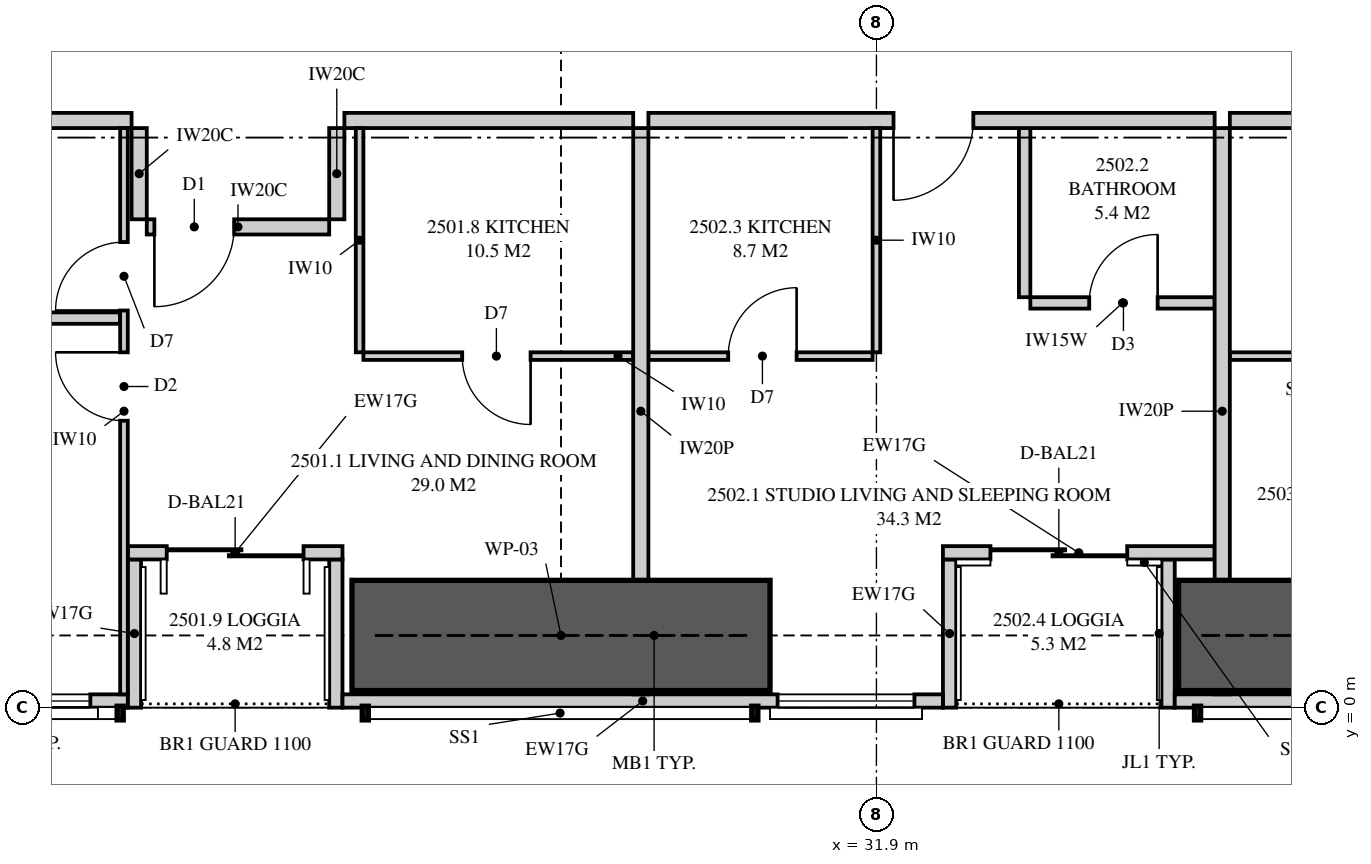
"""IFC4 building model, lengths in metres.
Left out: names, types, materials, properties, quantities, classifications, styles, units other than length and angle.
Written with IfcOpenShell. Run it as: python <this file> out.ifc"""

import sys

from ifc_helpers import new_model, si_unit, direction, frame, frame_2d, origin, place, context, subcontext, project, spatial, polyline, rectangle, outline, extrude, element, fill, save


model = new_model("IFC4")
c1 = context("Model", 3, precision=1e-05, world=origin(), true_north=direction((0.0, 1.0)))
c2 = subcontext(c1, "Body", "Model", "MODEL_VIEW")
j1 = project(units=[si_unit("LENGTHUNIT", "METRE"), si_unit("PLANEANGLEUNIT", "RADIAN")], contexts=[c1])
p1 = place(None, origin())
s1 = spatial("IfcSite", under=j1, at=p1, CompositionType="ELEMENT")
p2 = place(p1, origin())
s2 = spatial("IfcBuilding", under=s1, at=p2, CompositionType="ELEMENT")
p3 = place(p2, frame((0.0, 0.0, 94.8)))
s3 = spatial("IfcBuildingStorey", under=s2, at=p3, CompositionType="ELEMENT", Elevation=94.8)
p4 = place(p3, frame((9.051, 0.087, 0.0), z_axis=(0.0, 0.0, 1.0), x_axis=(1.0, 0.0, 0.0)))
e1 = element("IfcWall", 1, at=p4, inside=s3, PredefinedType="SOLIDWALL", context=c2, shape_type="SweptSolid", body=[
    extrude(outline(polyline([(0.0, 0.0), (12.999, 0.0), (12.999, 2.15), (7.824, 2.15), (7.824, 3.11), (7.666, 3.11), (7.666, 2.15), (7.62, 2.15), (7.62, 3.11), (0.0, 3.11), (0.0, 0.0)])), frame((0.0, 0.087, 0.0), z_axis=(0.0, -1.0, 0.0), x_axis=(1.0, 0.0, 0.0)), (0.0, 0.0, 1.0), 0.175),
])
p5 = place(p4, frame((3.134, 0.0, 0.4)))
e2 = element("IfcOpeningElement", 2, at=p5, cuts=e1, PredefinedType="OPENING", context=c2, shape_type="SweptSolid", body=[
    extrude(rectangle(XDim=1.8, YDim=1.7, at=frame_2d((0.9, 0.85))), frame((0.0, 0.097, 0.0), z_axis=(0.0, -1.0, 0.0), x_axis=(1.0, 0.0, 0.0)), (0.0, 0.0, 1.0), 0.195),
])
p6 = place(p4, frame((10.706, 0.0, 0.4)))
e3 = element("IfcOpeningElement", 3, at=p6, cuts=e1, PredefinedType="OPENING", context=c2, shape_type="SweptSolid", body=[
    extrude(rectangle(XDim=1.8, YDim=1.7, at=frame_2d((0.9, 0.85))), frame((0.0, 0.097, 0.0), z_axis=(0.0, -1.0, 0.0), x_axis=(1.0, 0.0, 0.0)), (0.0, 0.0, 1.0), 0.195),
])
p7 = place(p3, frame((24.875, 0.087, 0.0), z_axis=(0.0, 0.0, 1.0), x_axis=(1.0, 0.0, 0.0)))
e4 = element("IfcWall", 4, at=p7, inside=s3, PredefinedType="SOLIDWALL", context=c2, shape_type="SweptSolid", body=[
    extrude(rectangle(XDim=7.9, YDim=0.175, at=frame_2d((3.95, 0.0))), origin(), (0.0, 0.0, 1.0), 2.15),
])
p8 = place(p7, frame((5.725, 0.0, 0.4)))
e5 = element("IfcOpeningElement", 5, at=p8, cuts=e4, PredefinedType="OPENING", context=c2, shape_type="SweptSolid", body=[
    extrude(rectangle(XDim=1.8, YDim=1.7, at=frame_2d((0.9, 0.85))), frame((0.0, 0.097, 0.0), z_axis=(0.0, -1.0, 0.0), x_axis=(1.0, 0.0, 0.0)), (0.0, 0.0, 1.0), 0.195),
])
p9 = place(p3, frame((35.825, 0.087, 0.0), z_axis=(0.0, 0.0, 1.0), x_axis=(1.0, 0.0, 0.0)))
e6 = element("IfcWall", 6, at=p9, inside=s3, PredefinedType="SOLIDWALL", context=c2, shape_type="SweptSolid", body=[
    extrude(outline(polyline([(0.0, 0.0), (5.6, 0.0), (5.6, 3.11), (3.003, 3.11), (3.003, 2.15), (2.958, 2.15), (2.958, 3.11), (2.8, 3.11), (2.8, 2.15), (0.0, 2.15), (0.0, 0.0)])), frame((0.0, 0.087, 0.0), z_axis=(0.0, -1.0, 0.0), x_axis=(1.0, 0.0, 0.0)), (0.0, 0.0, 1.0), 0.175),
])
p10 = place(p3, frame((22.05, 2.038, 0.0), z_axis=(0.0, 0.0, 1.0), x_axis=(1.0, 0.0, 0.0)))
e7 = element("IfcWall", 7, at=p10, inside=s3, PredefinedType="SOLIDWALL", context=c2, shape_type="SweptSolid", body=[
    extrude(rectangle(XDim=2.825, YDim=0.175, at=frame_2d((1.413, 0.0))), origin(), (0.0, 0.0, 1.0), 3.11),
])
p11 = place(p10, frame((0.512, 0.0, 0.0)))
e8 = element("IfcOpeningElement", 8, at=p11, cuts=e7, PredefinedType="OPENING", context=c2, shape_type="SweptSolid", body=[
    extrude(rectangle(XDim=1.8, YDim=2.1, at=frame_2d((0.9, 1.05))), frame((0.0, 0.097, 0.0), z_axis=(0.0, -1.0, 0.0), x_axis=(1.0, 0.0, 0.0)), (0.0, 0.0, 1.0), 0.195),
])
for number, where, z_axis, x_axis in (
    (9, (22.137, 0.0, 0.0), (0.0, 0.0, 1.0), (0.0, 1.0, 0.0)),
    (10, (24.788, 0.0, 0.0), (0.0, 0.0, 1.0), (0.0, 1.0, 0.0)),
):
    element("IfcWall", number, at=place(p3, frame(where, z_axis=z_axis, x_axis=x_axis)), inside=s3, PredefinedType="SOLIDWALL", context=c2, shape_type="SweptSolid", body=[
        extrude(outline(polyline([(0.0, 0.0), (1.95, 0.0), (1.95, 3.11), (1.75, 3.11), (1.75, 2.15), (0.15, 2.15), (0.15, 3.11), (0.0, 3.11), (0.0, 0.0)])), frame((0.0, 0.087, 0.0), z_axis=(0.0, -1.0, 0.0), x_axis=(1.0, 0.0, 0.0)), (0.0, 0.0, 1.0), 0.175),
    ])
p12 = place(p3, frame((32.775, 2.038, 0.0), z_axis=(0.0, 0.0, 1.0), x_axis=(1.0, 0.0, 0.0)))
e11 = element("IfcWall", 11, at=p12, inside=s3, PredefinedType="SOLIDWALL", context=c2, shape_type="SweptSolid", body=[
    extrude(rectangle(XDim=3.575, YDim=0.175, at=frame_2d((1.788, 0.0))), origin(), (0.0, 0.0, 1.0), 3.11),
])
p13 = place(p12, frame((0.625, 0.0, 0.0)))
e12 = element("IfcOpeningElement", 12, at=p13, cuts=e11, PredefinedType="OPENING", context=c2, shape_type="SweptSolid", body=[
    extrude(rectangle(XDim=1.8, YDim=2.1, at=frame_2d((0.9, 1.05))), frame((0.0, 0.097, 0.0), z_axis=(0.0, -1.0, 0.0), x_axis=(1.0, 0.0, 0.0)), (0.0, 0.0, 1.0), 0.195),
])
for number, where, z_axis, x_axis in (
    (13, (32.863, 0.0, 0.0), (0.0, 0.0, 1.0), (0.0, 1.0, 0.0)),
    (14, (35.738, 0.0, 0.0), (0.0, 0.0, 1.0), (0.0, 1.0, 0.0)),
):
    element("IfcWall", number, at=place(p3, frame(where, z_axis=z_axis, x_axis=x_axis)), inside=s3, PredefinedType="SOLIDWALL", context=c2, shape_type="SweptSolid", body=[
        extrude(outline(polyline([(0.0, 0.0), (1.95, 0.0), (1.95, 3.11), (1.75, 3.11), (1.75, 2.15), (0.15, 2.15), (0.15, 3.11), (0.0, 3.11), (0.0, 0.0)])), frame((0.0, 0.087, 0.0), z_axis=(0.0, -1.0, 0.0), x_axis=(1.0, 0.0, 0.0)), (0.0, 0.0, 1.0), 0.175),
    ])
p14 = place(p3, frame((28.8, 0.175, 0.0), z_axis=(0.0, 0.0, 1.0), x_axis=(0.0, 1.0, 0.0)))
e15 = element("IfcWall", 15, at=p14, inside=s3, PredefinedType="PARTITIONING", context=c2, shape_type="SweptSolid", body=[
    extrude(outline(polyline([(0.529, 2.15), (0.0, 2.15), (0.0, 0.0), (0.529, 0.0), (0.529, 0.786), (1.021, 0.786), (1.021, 0.0), (7.45, 0.0), (7.45, 3.11), (1.685, 3.11), (1.685, 2.15), (1.021, 2.15), (1.021, 1.364), (0.529, 1.364), (0.529, 2.15)])), frame((0.0, 0.1, 0.0), z_axis=(0.0, -1.0, 0.0), x_axis=(1.0, 0.0, 0.0)), (0.0, 0.0, 1.0), 0.2),
])
p15 = place(p3, frame((17.775, 7.725, 0.0), z_axis=(0.0, 0.0, 1.0), x_axis=(1.0, 0.0, 0.0)))
e16 = element("IfcWall", 16, at=p15, inside=s3, PredefinedType="PARTITIONING", context=c2, shape_type="SweptSolid", body=[
    extrude(rectangle(XDim=4.325, YDim=0.2, at=frame_2d((2.163, 0.0))), origin(), (0.0, 0.0, 1.0), 3.11),
])
p16 = place(p3, frame((22.0, 0.175, 0.0), z_axis=(0.0, 0.0, 1.0), x_axis=(0.0, 1.0, 0.0)))
e17 = element("IfcWall", 17, at=p16, inside=s3, PredefinedType="PARTITIONING", context=c2, shape_type="SweptSolid", body=[
    extrude(outline(polyline([(0.0, 0.0), (7.45, 0.0), (7.45, 3.11), (1.635, 3.11), (1.635, 2.15), (0.0, 2.15), (0.0, 3.11), (0.0, 0.0)])), frame((0.0, 0.05, 0.0), z_axis=(0.0, -1.0, 0.0), x_axis=(1.0, 0.0, 0.0)), (0.0, 0.0, 1.0), 0.1),
])
p17 = place(p16, frame((3.6, 0.0, 0.0)))
e18 = element("IfcOpeningElement", 18, at=p17, cuts=e17, PredefinedType="OPENING", context=c2, shape_type="SweptSolid", body=[
    extrude(rectangle(XDim=0.9, YDim=2.1, at=frame_2d((0.45, 1.05))), frame((0.0, 0.06, 0.0), z_axis=(0.0, -1.0, 0.0), x_axis=(1.0, 0.0, 0.0)), (0.0, 0.0, 1.0), 0.12),
])
p18 = place(p16, frame((5.05, 0.0, 0.0)))
e19 = element("IfcOpeningElement", 19, at=p18, cuts=e17, PredefinedType="OPENING", context=c2, shape_type="SweptSolid", body=[
    extrude(rectangle(XDim=0.9, YDim=2.1, at=frame_2d((0.45, 1.05))), frame((0.0, 0.06, 0.0), z_axis=(0.0, -1.0, 0.0), x_axis=(1.0, 0.0, 0.0)), (0.0, 0.0, 1.0), 0.12),
])
p19 = place(p3, frame((17.75, 5.125, 0.0), z_axis=(0.0, 0.0, 1.0), x_axis=(1.0, 0.0, 0.0)))
e20 = element("IfcWall", 20, at=p19, inside=s3, PredefinedType="PLUMBINGWALL", context=c2, shape_type="SweptSolid", body=[
    extrude(rectangle(XDim=4.2, YDim=0.15, at=frame_2d((2.1, 0.0))), origin(), (0.0, 0.0, 1.0), 3.11),
])
p20 = place(p3, frame((25.15, 4.625, 0.0), z_axis=(0.0, 0.0, 1.0), x_axis=(1.0, 0.0, 0.0)))
e21 = element("IfcWall", 21, at=p20, inside=s3, PredefinedType="PARTITIONING", context=c2, shape_type="SweptSolid", body=[
    extrude(outline(polyline([(0.0, 0.0), (3.55, 0.0), (3.55, 3.11), (2.887, 3.11), (2.887, 2.541), (2.312, 2.541), (2.312, 3.11), (0.0, 3.11), (0.0, 0.0)])), frame((0.0, 0.05, 0.0), z_axis=(0.0, -1.0, 0.0), x_axis=(1.0, 0.0, 0.0)), (0.0, 0.0, 1.0), 0.1),
])
p21 = place(p20, frame((1.3, 0.0, 0.0)))
e22 = element("IfcOpeningElement", 22, at=p21, cuts=e21, PredefinedType="OPENING", context=c2, shape_type="SweptSolid", body=[
    extrude(rectangle(XDim=0.9, YDim=2.1, at=frame_2d((0.45, 1.05))), frame((0.0, 0.06, 0.0), z_axis=(0.0, -1.0, 0.0), x_axis=(1.0, 0.0, 0.0)), (0.0, 0.0, 1.0), 0.12),
])
p22 = place(p3, frame((25.1, 4.675, 0.0), z_axis=(0.0, 0.0, 1.0), x_axis=(0.0, 1.0, 0.0)))
e23 = element("IfcWall", 23, at=p22, inside=s3, PredefinedType="PARTITIONING", context=c2, shape_type="SweptSolid", body=[
    extrude(rectangle(XDim=2.95, YDim=0.1, at=frame_2d((1.475, 0.0))), origin(), (0.0, 0.0, 1.0), 3.11),
])
p23 = place(p3, frame((36.45, 0.175, 0.0), z_axis=(0.0, 0.0, 1.0), x_axis=(0.0, 1.0, 0.0)))
e24 = element("IfcWall", 24, at=p23, inside=s3, PredefinedType="PARTITIONING", context=c2, shape_type="SweptSolid", body=[
    extrude(outline(polyline([(0.529, 2.15), (0.0, 2.15), (0.0, 0.0), (0.529, 0.0), (0.529, 0.017), (1.021, 0.017), (1.021, 0.0), (7.45, 0.0), (7.45, 3.11), (1.685, 3.11), (1.685, 2.15), (1.021, 2.15), (1.021, 2.133), (0.529, 2.133), (0.529, 2.15)])), frame((0.0, 0.1, 0.0), z_axis=(0.0, -1.0, 0.0), x_axis=(1.0, 0.0, 0.0)), (0.0, 0.0, 1.0), 0.2),
])
p24 = place(p3, frame((28.9, 7.725, 0.0), z_axis=(0.0, 0.0, 1.0), x_axis=(1.0, 0.0, 0.0)))
e25 = element("IfcWall", 25, at=p24, inside=s3, PredefinedType="PARTITIONING", context=c2, shape_type="SweptSolid", body=[
    extrude(rectangle(XDim=7.45, YDim=0.2, at=frame_2d((3.725, 0.0))), origin(), (0.0, 0.0, 1.0), 3.11),
])
p25 = place(p24, frame((3.225, 0.0, 0.0)))
e26 = element("IfcOpeningElement", 26, at=p25, cuts=e25, PredefinedType="OPENING", context=c2, shape_type="SweptSolid", body=[
    extrude(rectangle(XDim=1.05, YDim=2.2, at=frame_2d((0.525, 1.1))), frame((0.0, 0.11, 0.0), z_axis=(0.0, -1.0, 0.0), x_axis=(1.0, 0.0, 0.0)), (0.0, 0.0, 1.0), 0.22),
])
p26 = place(p3, frame((33.925, 5.325, 0.0), z_axis=(0.0, 0.0, 1.0), x_axis=(1.0, 0.0, 0.0)))
e27 = element("IfcWall", 27, at=p26, inside=s3, PredefinedType="PLUMBINGWALL", context=c2, shape_type="SweptSolid", body=[
    extrude(rectangle(XDim=2.425, YDim=0.15, at=frame_2d((1.212, 0.0))), origin(), (0.0, 0.0, 1.0), 3.11),
])
p27 = place(p26, frame((0.775, 0.0, 0.0)))
e28 = element("IfcOpeningElement", 28, at=p27, cuts=e27, PredefinedType="OPENING", context=c2, shape_type="SweptSolid", body=[
    extrude(rectangle(XDim=0.9, YDim=2.1, at=frame_2d((0.45, 1.05))), frame((0.0, 0.085, 0.0), z_axis=(0.0, -1.0, 0.0), x_axis=(1.0, 0.0, 0.0)), (0.0, 0.0, 1.0), 0.17),
])
p28 = place(p3, frame((33.85, 5.4, 0.0), z_axis=(0.0, 0.0, 1.0), x_axis=(0.0, 1.0, 0.0)))
e29 = element("IfcWall", 29, at=p28, inside=s3, PredefinedType="PLUMBINGWALL", context=c2, shape_type="SweptSolid", body=[
    extrude(rectangle(XDim=2.225, YDim=0.15, at=frame_2d((1.113, 0.0))), origin(), (0.0, 0.0, 1.0), 3.11),
])
p29 = place(p3, frame((28.9, 4.625, 0.0), z_axis=(0.0, 0.0, 1.0), x_axis=(1.0, 0.0, 0.0)))
e30 = element("IfcWall", 30, at=p29, inside=s3, PredefinedType="PARTITIONING", context=c2, shape_type="SweptSolid", body=[
    extrude(rectangle(XDim=2.95, YDim=0.1, at=frame_2d((1.475, 0.0))), origin(), (0.0, 0.0, 1.0), 3.11),
])
p30 = place(p29, frame((1.05, 0.0, 0.0)))
e31 = element("IfcOpeningElement", 31, at=p30, cuts=e30, PredefinedType="OPENING", context=c2, shape_type="SweptSolid", body=[
    extrude(rectangle(XDim=0.9, YDim=2.1, at=frame_2d((0.45, 1.05))), frame((0.0, 0.06, 0.0), z_axis=(0.0, -1.0, 0.0), x_axis=(1.0, 0.0, 0.0)), (0.0, 0.0, 1.0), 0.12),
])
p31 = place(p3, frame((31.9, 4.675, 0.0), z_axis=(0.0, 0.0, 1.0), x_axis=(0.0, 1.0, 0.0)))
e32 = element("IfcWall", 32, at=p31, inside=s3, PredefinedType="PARTITIONING", context=c2, shape_type="SweptSolid", body=[
    extrude(rectangle(XDim=2.95, YDim=0.1, at=frame_2d((1.475, 0.0))), origin(), (0.0, 0.0, 1.0), 3.11),
])
p32 = place(p3, frame((36.55, 7.725, 0.0), z_axis=(0.0, 0.0, 1.0), x_axis=(1.0, 0.0, 0.0)))
e33 = element("IfcWall", 33, at=p32, inside=s3, PredefinedType="PARTITIONING", context=c2, shape_type="SweptSolid", body=[
    extrude(outline(polyline([(0.0, 0.0), (9.475, 0.0), (9.475, 3.11), (2.412, 3.11), (2.412, 2.541), (1.738, 2.541), (1.738, 3.11), (0.0, 3.11), (0.0, 0.0)])), frame((0.0, 0.1, 0.0), z_axis=(0.0, -1.0, 0.0), x_axis=(1.0, 0.0, 0.0)), (0.0, 0.0, 1.0), 0.2),
])
p33 = place(p32, frame((2.4, 0.0, 0.0)))
e34 = element("IfcOpeningElement", 34, at=p33, cuts=e33, PredefinedType="OPENING", context=c2, shape_type="SweptSolid", body=[
    extrude(rectangle(XDim=1.05, YDim=2.2, at=frame_2d((0.525, 1.1))), frame((0.0, 0.11, 0.0), z_axis=(0.0, -1.0, 0.0), x_axis=(1.0, 0.0, 0.0)), (0.0, 0.0, 1.0), 0.22),
])
p34 = place(p3, frame((36.55, 4.625, 0.0), z_axis=(0.0, 0.0, 1.0), x_axis=(1.0, 0.0, 0.0)))
e35 = element("IfcWall", 35, at=p34, inside=s3, PredefinedType="PARTITIONING", context=c2, shape_type="SweptSolid", body=[
    extrude(outline(polyline([(0.0, 0.0), (3.55, 0.0), (3.55, 3.11), (2.362, 3.11), (2.362, 2.541), (1.788, 2.541), (1.788, 3.11), (0.0, 3.11), (0.0, 0.0)])), frame((0.0, 0.05, 0.0), z_axis=(0.0, -1.0, 0.0), x_axis=(1.0, 0.0, 0.0)), (0.0, 0.0, 1.0), 0.1),
])
p35 = place(p34, frame((1.35, 0.0, 0.0)))
e36 = element("IfcOpeningElement", 36, at=p35, cuts=e35, PredefinedType="OPENING", context=c2, shape_type="SweptSolid", body=[
    extrude(rectangle(XDim=0.9, YDim=2.1, at=frame_2d((0.45, 1.05))), frame((0.0, 0.06, 0.0), z_axis=(0.0, -1.0, 0.0), x_axis=(1.0, 0.0, 0.0)), (0.0, 0.0, 1.0), 0.12),
])
p36 = place(p3, frame((24.9, 7.725, 0.0), z_axis=(0.0, 0.0, 1.0), x_axis=(1.0, 0.0, 0.0)))
e37 = element("IfcWall", 37, at=p36, inside=s3, PredefinedType="PARTITIONING", context=c2, shape_type="SweptSolid", body=[
    extrude(outline(polyline([(0.0, 0.0), (3.8, 0.0), (3.8, 3.11), (3.187, 3.11), (3.187, 2.541), (2.513, 2.541), (2.513, 3.11), (0.0, 3.11), (0.0, 0.0)])), frame((0.0, 0.1, 0.0), z_axis=(0.0, -1.0, 0.0), x_axis=(1.0, 0.0, 0.0)), (0.0, 0.0, 1.0), 0.2),
])
p37 = place(p3, frame((22.3, 6.325, 0.0), z_axis=(0.0, 0.0, 1.0), x_axis=(1.0, 0.0, 0.0)))
e38 = element("IfcWall", 38, at=p37, inside=s3, PredefinedType="PARTITIONING", context=c2, shape_type="SweptSolid", body=[
    extrude(rectangle(XDim=2.4, YDim=0.2, at=frame_2d((1.2, 0.0))), origin(), (0.0, 0.0, 1.0), 3.11),
])
p38 = place(p37, frame((0.1, 0.0, 0.0)))
e39 = element("IfcOpeningElement", 39, at=p38, cuts=e38, PredefinedType="OPENING", context=c2, shape_type="SweptSolid", body=[
    extrude(rectangle(XDim=1.05, YDim=2.2, at=frame_2d((0.525, 1.1))), frame((0.0, 0.11, 0.0), z_axis=(0.0, -1.0, 0.0), x_axis=(1.0, 0.0, 0.0)), (0.0, 0.0, 1.0), 0.22),
])
for number, where, z_axis, x_axis in (
    (40, (22.2, 7.625, 0.0), (0.0, 0.0, 1.0), (0.0, -1.0, 0.0)),
    (41, (24.8, 7.625, 0.0), (0.0, 0.0, 1.0), (0.0, -1.0, 0.0)),
):
    element("IfcWall", number, at=place(p3, frame(where, z_axis=z_axis, x_axis=x_axis)), inside=s3, PredefinedType="PARTITIONING", context=c2, shape_type="SweptSolid", body=[
        extrude(rectangle(XDim=1.2, YDim=0.2, at=frame_2d((0.6, 0.0))), origin(), (0.0, 0.0, 1.0), 3.11),
    ])
for number, where, z_axis, x_axis in (
    (42, (25.0, 0.95, 0.0), (0.0, 0.0, 1.0), (1.0, 0.0, 0.0)),
    (43, (35.875, 0.95, 0.0), (0.0, 0.0, 1.0), (1.0, 0.0, 0.0)),
):
    element("IfcWall", number, at=place(p3, frame(where, z_axis=z_axis, x_axis=x_axis)), inside=s3, PredefinedType="SHEAR", context=c2, shape_type="SweptSolid", body=[
        extrude(rectangle(XDim=5.5, YDim=1.45, at=frame_2d((2.75, 0.0))), origin(), (0.0, 0.0, 1.0), 3.35),
    ])
p39 = place(p6, origin())
e44 = element("IfcWindow", 44, at=p39, inside=s3, PartitioningType="SINGLE_PANEL", PredefinedType="WINDOW", context=c2, shape_type="SweptSolid", body=[
    extrude(rectangle(XDim=1.8, YDim=1.7, at=frame_2d((0.9, 0.85))), frame((0.0, 0.03, 0.0), z_axis=(0.0, -1.0, 0.0), x_axis=(1.0, 0.0, 0.0)), (0.0, 0.0, 1.0), 0.06),
])
fill(e3, e44)
p40 = place(p11, origin())
e45 = element("IfcDoor", 45, at=p40, inside=s3, OperationType="SLIDING_TO_LEFT", PredefinedType="DOOR", context=c2, shape_type="SweptSolid", body=[
    extrude(rectangle(XDim=1.8, YDim=2.1, at=frame_2d((0.9, 1.05))), frame((0.0, 0.025, 0.0), z_axis=(0.0, -1.0, 0.0), x_axis=(1.0, 0.0, 0.0)), (0.0, 0.0, 1.0), 0.05),
])
fill(e8, e45)
p41 = place(p13, origin())
e46 = element("IfcDoor", 46, at=p41, inside=s3, OperationType="SLIDING_TO_LEFT", PredefinedType="DOOR", context=c2, shape_type="SweptSolid", body=[
    extrude(rectangle(XDim=1.8, YDim=2.1, at=frame_2d((0.9, 1.05))), frame((0.0, 0.025, 0.0), z_axis=(0.0, -1.0, 0.0), x_axis=(1.0, 0.0, 0.0)), (0.0, 0.0, 1.0), 0.05),
])
fill(e12, e46)
p42 = place(p8, origin())
e47 = element("IfcWindow", 47, at=p42, inside=s3, PartitioningType="SINGLE_PANEL", PredefinedType="WINDOW", context=c2, shape_type="SweptSolid", body=[
    extrude(rectangle(XDim=1.8, YDim=1.7, at=frame_2d((0.9, 0.85))), frame((0.0, 0.03, 0.0), z_axis=(0.0, -1.0, 0.0), x_axis=(1.0, 0.0, 0.0)), (0.0, 0.0, 1.0), 0.06),
])
fill(e5, e47)
p43 = place(p38, frame((1.05, 0.0, 0.0), z_axis=(0.0, 0.0, 1.0), x_axis=(-1.0, 0.0, 0.0)))
e48 = element("IfcDoor", 48, at=p43, inside=s3, OperationType="SINGLE_SWING_RIGHT", PredefinedType="DOOR", context=c2, shape_type="SweptSolid", body=[
    extrude(rectangle(XDim=1.05, YDim=2.2, at=frame_2d((0.525, 1.1))), frame((0.0, 0.025, 0.0), z_axis=(0.0, -1.0, 0.0), x_axis=(1.0, 0.0, 0.0)), (0.0, 0.0, 1.0), 0.05),
])
fill(e39, e48)
p44 = place(p17, origin())
e49 = element("IfcDoor", 49, at=p44, inside=s3, OperationType="SINGLE_SWING_RIGHT", PredefinedType="DOOR", context=c2, shape_type="SweptSolid", body=[
    extrude(rectangle(XDim=0.9, YDim=2.1, at=frame_2d((0.45, 1.05))), frame((0.0, 0.025, 0.0), z_axis=(0.0, -1.0, 0.0), x_axis=(1.0, 0.0, 0.0)), (0.0, 0.0, 1.0), 0.05),
])
fill(e18, e49)
p45 = place(p18, origin())
e50 = element("IfcDoor", 50, at=p45, inside=s3, OperationType="SINGLE_SWING_LEFT", PredefinedType="DOOR", context=c2, shape_type="SweptSolid", body=[
    extrude(rectangle(XDim=0.9, YDim=2.1, at=frame_2d((0.45, 1.05))), frame((0.0, 0.025, 0.0), z_axis=(0.0, -1.0, 0.0), x_axis=(1.0, 0.0, 0.0)), (0.0, 0.0, 1.0), 0.05),
])
fill(e19, e50)
p46 = place(p21, frame((0.9, 0.0, 0.0), z_axis=(0.0, 0.0, 1.0), x_axis=(-1.0, 0.0, 0.0)))
e51 = element("IfcDoor", 51, at=p46, inside=s3, OperationType="SINGLE_SWING_LEFT", PredefinedType="DOOR", context=c2, shape_type="SweptSolid", body=[
    extrude(rectangle(XDim=0.9, YDim=2.1, at=frame_2d((0.45, 1.05))), frame((0.0, 0.025, 0.0), z_axis=(0.0, -1.0, 0.0), x_axis=(1.0, 0.0, 0.0)), (0.0, 0.0, 1.0), 0.05),
])
fill(e22, e51)
p47 = place(p25, frame((1.05, 0.0, 0.0), z_axis=(0.0, 0.0, 1.0), x_axis=(-1.0, 0.0, 0.0)))
e52 = element("IfcDoor", 52, at=p47, inside=s3, OperationType="SINGLE_SWING_RIGHT", PredefinedType="DOOR", context=c2, shape_type="SweptSolid", body=[
    extrude(rectangle(XDim=1.05, YDim=2.2, at=frame_2d((0.525, 1.1))), frame((0.0, 0.025, 0.0), z_axis=(0.0, -1.0, 0.0), x_axis=(1.0, 0.0, 0.0)), (0.0, 0.0, 1.0), 0.05),
])
fill(e26, e52)
p48 = place(p27, origin())
e53 = element("IfcDoor", 53, at=p48, inside=s3, OperationType="SINGLE_SWING_RIGHT", PredefinedType="DOOR", context=c2, shape_type="SweptSolid", body=[
    extrude(rectangle(XDim=0.9, YDim=2.1, at=frame_2d((0.45, 1.05))), frame((0.0, 0.025, 0.0), z_axis=(0.0, -1.0, 0.0), x_axis=(1.0, 0.0, 0.0)), (0.0, 0.0, 1.0), 0.05),
])
fill(e28, e53)
p49 = place(p30, origin())
e54 = element("IfcDoor", 54, at=p49, inside=s3, OperationType="SINGLE_SWING_RIGHT", PredefinedType="DOOR", context=c2, shape_type="SweptSolid", body=[
    extrude(rectangle(XDim=0.9, YDim=2.1, at=frame_2d((0.45, 1.05))), frame((0.0, 0.025, 0.0), z_axis=(0.0, -1.0, 0.0), x_axis=(1.0, 0.0, 0.0)), (0.0, 0.0, 1.0), 0.05),
])
fill(e31, e54)
save(model, sys.argv[1])
